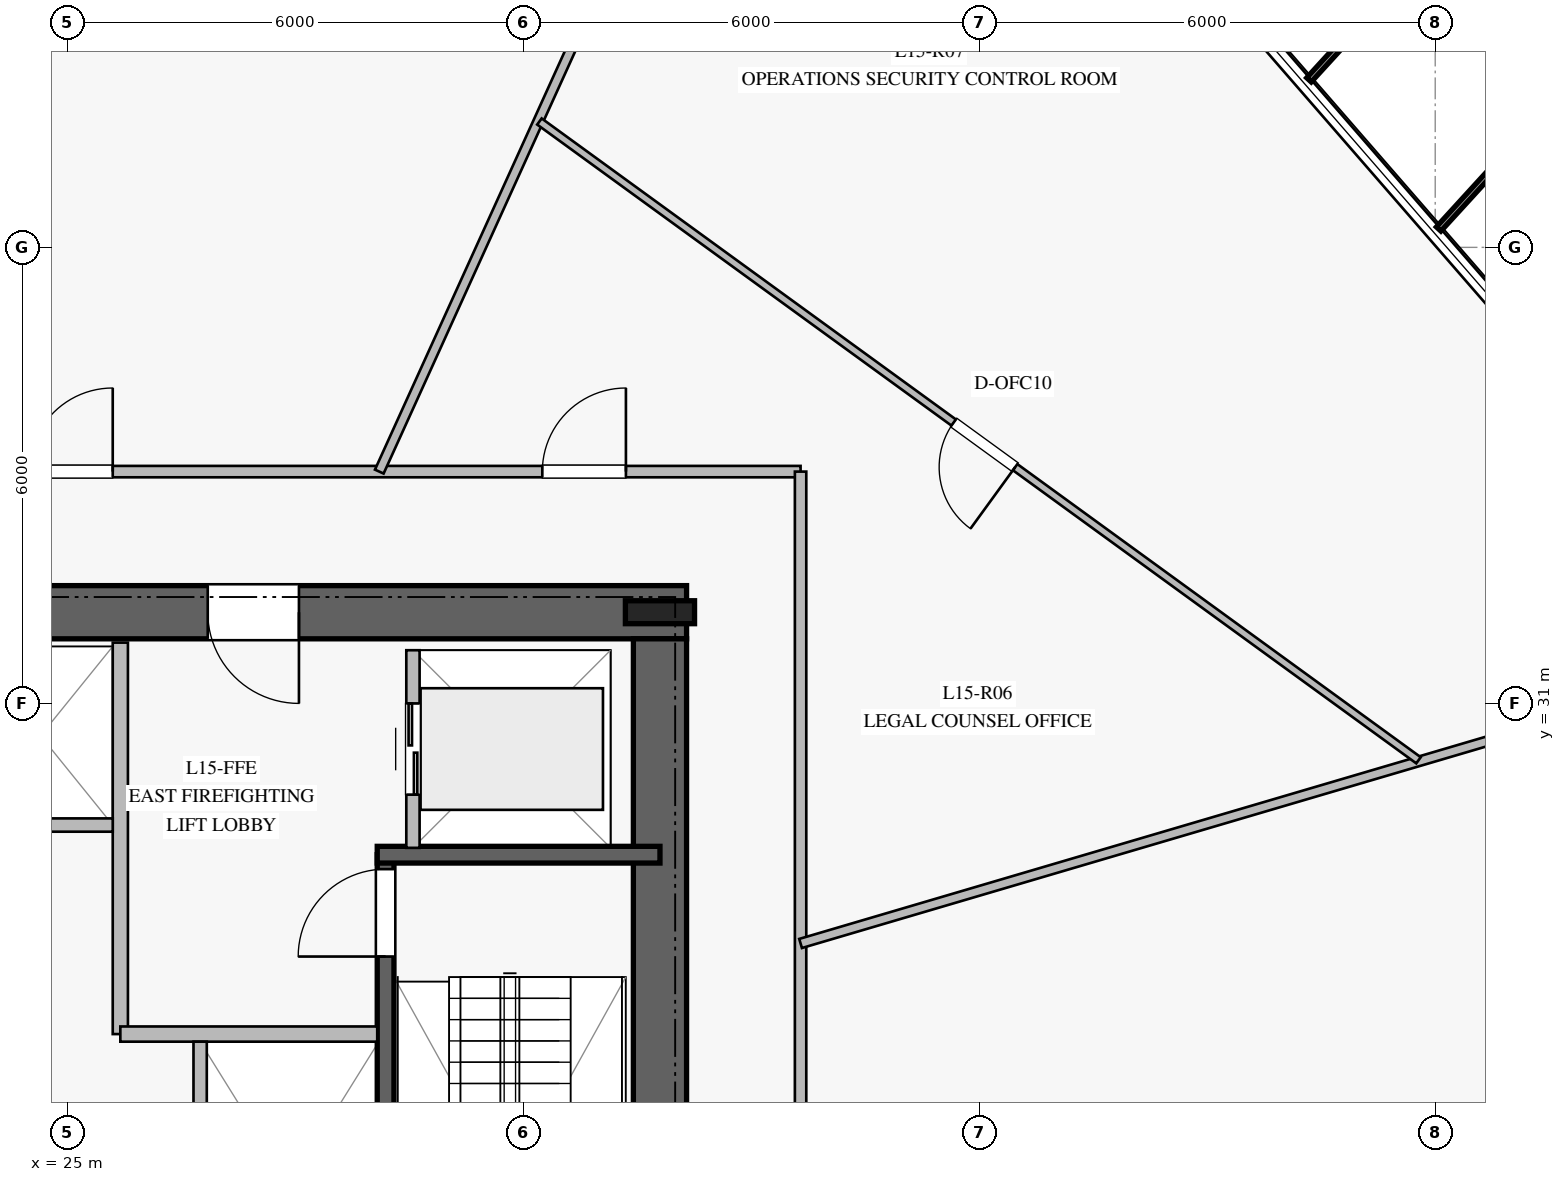
"""IFC4 building model, lengths in metres.
Left out: names, types, materials, properties, quantities, classifications, styles, units other than length and angle.
Written with IfcOpenShell. Run it as: python <this file> out.ifc"""

import sys

from ifc_helpers import new_model, si_unit, direction, frame, frame_2d, origin, origin_2d, place, context, subcontext, project, spatial, rectangle, i_section, extrude, element, fill, save


model = new_model("IFC4")
c1 = context("Model", 3, precision=1e-05, world=origin(), true_north=direction((0.0, 1.0)))
c2 = subcontext(c1, "Body", "Model", "MODEL_VIEW")
j1 = project(units=[si_unit("LENGTHUNIT", "METRE"), si_unit("PLANEANGLEUNIT", "RADIAN")], contexts=[c1])
p1 = place(None, origin())
s1 = spatial("IfcSite", under=j1, at=p1, CompositionType="ELEMENT")
p2 = place(p1, origin())
s2 = spatial("IfcBuilding", under=s1, at=p2, CompositionType="ELEMENT")
p3 = place(p2, frame((0.0, 0.0, 64.0)))
s3 = spatial("IfcBuildingStorey", under=s2, at=p3, CompositionType="ELEMENT", Elevation=64.0)
p4 = place(p3, frame((33.15, 32.2, 0.0), z_axis=(0.0, 0.0, 1.0), x_axis=(-1.0, 0.0, 0.0)))
e1 = element("IfcWall", 1, at=p4, inside=s3, PredefinedType="SHEAR", context=c2, shape_type="SweptSolid", body=[
    extrude(rectangle(XDim=16.3, YDim=0.7, at=frame_2d((8.15, 0.0))), origin(), (0.0, 0.0, 1.0), 3.76),
])
p5 = place(p4, frame((5.1, 0.0, 0.0)))
e2 = element("IfcOpeningElement", 2, at=p5, cuts=e1, PredefinedType="OPENING", context=c2, shape_type="SweptSolid", body=[
    extrude(rectangle(XDim=1.2, YDim=2.25, at=frame_2d((0.6, 1.125))), frame((0.0, 0.36, 0.0), z_axis=(0.0, -1.0, 0.0), x_axis=(1.0, 0.0, 0.0)), (0.0, 0.0, 1.0), 0.72),
])
p6 = place(p3, frame((32.8, 18.15, 0.0), z_axis=(0.0, 0.0, 1.0), x_axis=(0.0, 1.0, 0.0)))
e3 = element("IfcWall", 3, at=p6, inside=s3, PredefinedType="SHEAR", context=c2, shape_type="SweptSolid", body=[
    extrude(rectangle(XDim=13.7, YDim=0.7, at=frame_2d((6.85, 0.0))), origin(), (0.0, 0.0, 1.0), 3.76),
])
p7 = place(p3, frame((32.8, 32.2, 0.0), z_axis=(0.0, 0.0, 1.0), x_axis=(1.0, 0.0, 0.0)))
e4 = element("IfcColumn", 4, at=p7, inside=s3, PredefinedType="COLUMN", context=c2, shape_type="SweptSolid", body=[
    extrude(i_section(OverallWidth=0.302, OverallDepth=0.91, WebThickness=0.021, FlangeThickness=0.04, at=origin_2d()), origin(), (0.0, 0.0, 1.0), 4.0),
])
p8 = place(p3, frame((29.19, 21.79, 0.0), z_axis=(0.0, 0.0, 1.0), x_axis=(0.0, 1.0, 0.0)))
e5 = element("IfcWall", 5, at=p8, inside=s3, PredefinedType="SOLIDWALL", context=c2, shape_type="SweptSolid", body=[
    extrude(rectangle(XDim=7.22, YDim=0.22, at=frame_2d((3.61, 0.0))), origin(), (0.0, 0.0, 1.0), 3.76),
])
p9 = place(p8, frame((5.88, 0.0, 0.0)))
e6 = element("IfcOpeningElement", 6, at=p9, cuts=e5, PredefinedType="OPENING", context=c2, shape_type="SweptSolid", body=[
    extrude(rectangle(XDim=1.15, YDim=2.2, at=frame_2d((0.575, 1.1))), frame((0.0, 0.12, 0.0), z_axis=(0.0, -1.0, 0.0), x_axis=(1.0, 0.0, 0.0)), (0.0, 0.0, 1.0), 0.24),
])
p10 = place(p3, frame((29.08, 29.01, 0.0), z_axis=(0.0, 0.0, 1.0), x_axis=(1.0, 0.0, 0.0)))
e7 = element("IfcWall", 7, at=p10, inside=s3, PredefinedType="SOLIDWALL", context=c2, shape_type="SweptSolid", body=[
    extrude(rectangle(XDim=3.72, YDim=0.22, at=frame_2d((1.86, 0.0))), origin(), (0.0, 0.0, 1.0), 3.76),
])
p11 = place(p3, frame((25.7, 26.65, 0.0), z_axis=(0.0, 0.0, 1.0), x_axis=(0.0, 1.0, 0.0)))
e8 = element("IfcWall", 8, at=p11, inside=s3, PredefinedType="PARTITIONING", context=c2, shape_type="SweptSolid", body=[
    extrude(rectangle(XDim=5.15, YDim=0.2, at=frame_2d((2.575, 0.0))), origin(), (0.0, 0.0, 1.0), 3.76),
])
p12 = place(p3, frame((25.7, 26.65, 0.0), z_axis=(0.0, 0.0, 1.0), x_axis=(1.0, 0.0, 0.0)))
e9 = element("IfcWall", 9, at=p12, inside=s3, PredefinedType="PARTITIONING", context=c2, shape_type="SweptSolid", body=[
    extrude(rectangle(XDim=3.38, YDim=0.2, at=frame_2d((1.69, 0.0))), origin(), (0.0, 0.0, 1.0), 3.76),
])
for number, where, z_axis, x_axis in (
    (10, (23.7, 29.4, 0.0), (0.0, 0.0, 1.0), (1.0, 0.0, 0.0)),
    (11, (26.75, 24.65, 0.0), (0.0, 0.0, 1.0), (0.0, 1.0, 0.0)),
):
    element("IfcWall", number, at=place(p3, frame(where, z_axis=z_axis, x_axis=x_axis)), inside=s3, PredefinedType="PARTITIONING", context=c2, shape_type="SweptSolid", body=[
        extrude(rectangle(XDim=1.9, YDim=0.175, at=frame_2d((0.95, 0.0))), origin(), (0.0, 0.0, 1.0), 3.76),
    ])
p13 = place(p3, frame((29.55, 29.1, 0.0), z_axis=(0.0, 0.0, 1.0), x_axis=(0.0, 1.0, 0.0)))
e12 = element("IfcWall", 12, at=p13, inside=s3, PredefinedType="PARTITIONING", context=c2, shape_type="SweptSolid", body=[
    extrude(rectangle(XDim=2.6, YDim=0.175, at=frame_2d((1.3, 0.0))), origin(), (0.0, 0.0, 1.0), 3.76),
])
p14 = place(p13, frame((0.7, 0.0, 0.0)))
e13 = element("IfcOpeningElement", 13, at=p14, cuts=e12, PredefinedType="OPENING", context=c2, shape_type="SweptSolid", body=[
    extrude(rectangle(XDim=1.2, YDim=2.2, at=frame_2d((0.6, 1.1))), frame((0.0, 0.098, 0.0), z_axis=(0.0, -1.0, 0.0), x_axis=(1.0, 0.0, 0.0)), (0.0, 0.0, 1.0), 0.195),
])
p15 = place(p3, frame((15.35, 34.05, 0.0), z_axis=(0.0, 0.0, 1.0), x_axis=(1.0, 0.0, 0.0)))
e14 = element("IfcWall", 14, at=p15, inside=s3, PredefinedType="PARTITIONING", context=c2, shape_type="SweptSolid", body=[
    extrude(rectangle(XDim=19.3, YDim=0.15, at=frame_2d((9.65, 0.0))), origin(), (0.0, 0.0, 1.0), 3.21),
])
p16 = place(p15, frame((15.902, 0.0, 0.0)))
e15 = element("IfcOpeningElement", 15, at=p16, cuts=e14, PredefinedType="OPENING", context=c2, shape_type="SweptSolid", body=[
    extrude(rectangle(XDim=1.1, YDim=2.2, at=frame_2d((0.55, 1.1))), frame((0.0, 0.085, 0.0), z_axis=(0.0, -1.0, 0.0), x_axis=(1.0, 0.0, 0.0)), (0.0, 0.0, 1.0), 0.17),
])
p17 = place(p15, frame((9.15, 0.0, 0.0)))
e16 = element("IfcOpeningElement", 16, at=p17, cuts=e14, PredefinedType="OPENING", context=c2, shape_type="SweptSolid", body=[
    extrude(rectangle(XDim=1.1, YDim=2.2, at=frame_2d((0.55, 1.1))), frame((0.0, 0.085, 0.0), z_axis=(0.0, -1.0, 0.0), x_axis=(1.0, 0.0, 0.0)), (0.0, 0.0, 1.0), 0.17),
])
p18 = place(p15, frame((2.437, 0.0, 0.0)))
e17 = element("IfcOpeningElement", 17, at=p18, cuts=e14, PredefinedType="OPENING", context=c2, shape_type="SweptSolid", body=[
    extrude(rectangle(XDim=1.1, YDim=2.2, at=frame_2d((0.55, 1.1))), frame((0.0, 0.085, 0.0), z_axis=(0.0, -1.0, 0.0), x_axis=(1.0, 0.0, 0.0)), (0.0, 0.0, 1.0), 0.17),
])
p19 = place(p3, frame((34.65, 34.05, 0.0), z_axis=(0.0, 0.0, 1.0), x_axis=(0.0, -1.0, 0.0)))
e18 = element("IfcWall", 18, at=p19, inside=s3, PredefinedType="PARTITIONING", context=c2, shape_type="SweptSolid", body=[
    extrude(rectangle(XDim=18.1, YDim=0.15, at=frame_2d((9.05, 0.0))), origin(), (0.0, 0.0, 1.0), 3.21),
])
p20 = place(p19, frame((15.31, 0.0, 0.0)))
e19 = element("IfcOpeningElement", 19, at=p20, cuts=e18, PredefinedType="OPENING", context=c2, shape_type="SweptSolid", body=[
    extrude(rectangle(XDim=1.1, YDim=2.2, at=frame_2d((0.55, 1.1))), frame((0.0, 0.085, 0.0), z_axis=(0.0, -1.0, 0.0), x_axis=(1.0, 0.0, 0.0)), (0.0, 0.0, 1.0), 0.17),
])
p21 = place(p19, frame((9.532, 0.0, 0.0)))
e20 = element("IfcOpeningElement", 20, at=p21, cuts=e18, PredefinedType="OPENING", context=c2, shape_type="SweptSolid", body=[
    extrude(rectangle(XDim=1.1, YDim=2.2, at=frame_2d((0.55, 1.1))), frame((0.0, 0.085, 0.0), z_axis=(0.0, -1.0, 0.0), x_axis=(1.0, 0.0, 0.0)), (0.0, 0.0, 1.0), 0.17),
])
p22 = place(p3, frame((29.107, 34.05, 0.0), z_axis=(0.0, 0.0, 1.0), x_axis=(0.413251031514, 0.910617145101, 0.0)))
e21 = element("IfcWall", 21, at=p22, inside=s3, PredefinedType="PARTITIONING", context=c2, shape_type="SweptSolid", body=[
    extrude(rectangle(XDim=13.766, YDim=0.125, at=frame_2d((6.883, 0.0))), origin(), (0.0, 0.0, 1.0), 3.06),
])
p23 = place(p3, frame((34.65, 27.842, 0.0), z_axis=(0.0, 0.0, 1.0), x_axis=(0.959267461701, 0.282499445878, 0.0)))
e22 = element("IfcWall", 22, at=p23, inside=s3, PredefinedType="PARTITIONING", context=c2, shape_type="SweptSolid", body=[
    extrude(rectangle(XDim=10.633, YDim=0.125, at=frame_2d((5.317, 0.0))), origin(), (0.0, 0.0, 1.0), 3.06),
])
p24 = place(p3, frame((42.78, 30.252, 0.0), z_axis=(0.0, 0.0, 1.0), x_axis=(-0.808986344623, 0.587827435744, 0.0)))
e23 = element("IfcWall", 23, at=p24, inside=s3, PredefinedType="MOVABLE", context=c2, shape_type="SweptSolid", body=[
    extrude(rectangle(XDim=14.297, YDim=0.1, at=frame_2d((7.148, 0.0))), origin(), (0.0, 0.0, 1.0), 3.21),
])
p25 = place(p24, frame((6.56, 0.0, 0.0)))
e24 = element("IfcOpeningElement", 24, at=p25, cuts=e23, PredefinedType="OPENING", context=c2, shape_type="SweptSolid", body=[
    extrude(rectangle(XDim=1.0, YDim=2.15, at=frame_2d((0.5, 1.075))), frame((0.0, 0.06, 0.0), z_axis=(0.0, -1.0, 0.0), x_axis=(1.0, 0.0, 0.0)), (0.0, 0.0, 1.0), 0.12),
])
p26 = place(p9, origin())
e25 = element("IfcDoor", 25, at=p26, inside=s3, OperationType="SINGLE_SWING_LEFT", PredefinedType="DOOR", context=c2, shape_type="SweptSolid", body=[
    extrude(rectangle(XDim=1.15, YDim=2.2, at=frame_2d((0.575, 1.1))), frame((0.0, 0.025, 0.0), z_axis=(0.0, -1.0, 0.0), x_axis=(1.0, 0.0, 0.0)), (0.0, 0.0, 1.0), 0.05),
])
fill(e6, e25)
p27 = place(p5, origin())
e26 = element("IfcDoor", 26, at=p27, inside=s3, OperationType="SINGLE_SWING_LEFT", PredefinedType="DOOR", context=c2, shape_type="SweptSolid", body=[
    extrude(rectangle(XDim=1.2, YDim=2.25, at=frame_2d((0.6, 1.125))), frame((0.0, 0.025, 0.0), z_axis=(0.0, -1.0, 0.0), x_axis=(1.0, 0.0, 0.0)), (0.0, 0.0, 1.0), 0.05),
])
fill(e2, e26)
p28 = place(p14, origin())
e27 = element("IfcDoor", 27, at=p28, inside=s3, OperationType="DOUBLE_DOOR_SLIDING", PredefinedType="DOOR", context=c2, shape_type="SweptSolid", body=[
    extrude(rectangle(XDim=1.2, YDim=2.2, at=frame_2d((0.6, 1.1))), frame((0.0, 0.025, 0.0), z_axis=(0.0, -1.0, 0.0), x_axis=(1.0, 0.0, 0.0)), (0.0, 0.0, 1.0), 0.05),
])
fill(e13, e27)
p29 = place(p16, origin())
e28 = element("IfcDoor", 28, at=p29, inside=s3, OperationType="SINGLE_SWING_RIGHT", PredefinedType="DOOR", context=c2, shape_type="SweptSolid", body=[
    extrude(rectangle(XDim=1.1, YDim=2.2, at=frame_2d((0.55, 1.1))), frame((0.0, 0.025, 0.0), z_axis=(0.0, -1.0, 0.0), x_axis=(1.0, 0.0, 0.0)), (0.0, 0.0, 1.0), 0.05),
])
fill(e15, e28)
p30 = place(p25, origin())
e29 = element("IfcDoor", 29, at=p30, inside=s3, OperationType="SINGLE_SWING_LEFT", PredefinedType="DOOR", context=c2, shape_type="SweptSolid", body=[
    extrude(rectangle(XDim=1.0, YDim=2.15, at=frame_2d((0.5, 1.075))), frame((0.0, 0.025, 0.0), z_axis=(0.0, -1.0, 0.0), x_axis=(1.0, 0.0, 0.0)), (0.0, 0.0, 1.0), 0.05),
])
fill(e24, e29)
p31 = place(p17, origin())
e30 = element("IfcDoor", 30, at=p31, inside=s3, OperationType="SINGLE_SWING_RIGHT", PredefinedType="DOOR", context=c2, shape_type="SweptSolid", body=[
    extrude(rectangle(XDim=1.1, YDim=2.2, at=frame_2d((0.55, 1.1))), frame((0.0, 0.025, 0.0), z_axis=(0.0, -1.0, 0.0), x_axis=(1.0, 0.0, 0.0)), (0.0, 0.0, 1.0), 0.05),
])
fill(e16, e30)
save(model, sys.argv[1])
